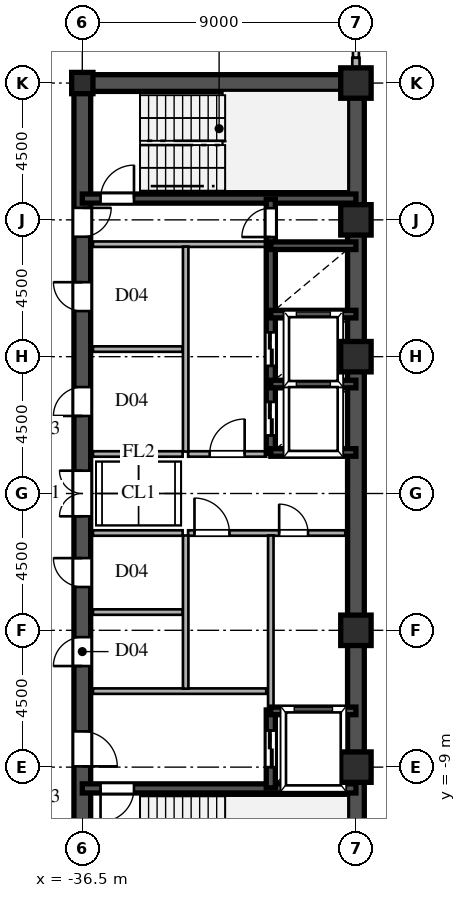
"""IFC4 building model, lengths in metres.
Left out: names, types, materials, properties, quantities, classifications, styles, units other than length and angle.
Written with IfcOpenShell. Run it as: python <this file> out.ifc"""

import sys

from ifc_helpers import new_model, si_unit, direction, frame, frame_2d, origin, origin_2d, place, context, subcontext, project, spatial, rectangle, hollow_rectangle, i_section, extrude, source, transform, mapped, element, fill, save


model = new_model("IFC4")
c1 = context("Model", 3, precision=1e-05, world=origin(), true_north=direction((0.0, 1.0)))
c2 = subcontext(c1, "Body", "Model", "MODEL_VIEW")
j1 = project(units=[si_unit("LENGTHUNIT", "METRE"), si_unit("PLANEANGLEUNIT", "RADIAN")], contexts=[c1])
p1 = place(None, origin())
s1 = spatial("IfcSite", under=j1, at=p1, CompositionType="ELEMENT")
p2 = place(p1, origin())
s2 = spatial("IfcBuilding", under=s1, at=p2, CompositionType="ELEMENT")
p3 = place(p2, frame((0.0, 0.0, 151.2)))
s3 = spatial("IfcBuildingStorey", under=s2, at=p3, CompositionType="ELEMENT", Elevation=151.2)
m1 = source(origin(), c2, "Body", "SweptSolid", [
    extrude(hollow_rectangle(XDim=1.0, YDim=1.0, WallThickness=0.042, at=origin_2d()), origin(), (0.0, 0.0, 1.0), 3.6),
])
for number, where, z_axis, x_axis in (
    (1, (-27.5, -9.0, 0.0), (0.0, 0.0, 1.0), (1.0, 0.0, 0.0)),
    (2, (-27.5, -4.5, 0.0), (0.0, 0.0, 1.0), (1.0, 0.0, 0.0)),
    (3, (-27.5, 4.5, 0.0), (0.0, 0.0, 1.0), (1.0, 0.0, 0.0)),
    (4, (-27.5, 9.0, 0.0), (0.0, 0.0, 1.0), (1.0, 0.0, 0.0)),
    (5, (-27.5, 13.5, 0.0), (0.0, 0.0, 1.0), (1.0, 0.0, 0.0)),
):
    element("IfcColumn", number, at=place(p3, frame(where, z_axis=z_axis, x_axis=x_axis)), inside=s3, PredefinedType="COLUMN", context=c2, shape_type="MappedRepresentation", body=[
        mapped(m1, transform((0.0, 0.0, 0.0), scale=1.0)),
    ])
m2 = source(origin(), c2, "Body", "SweptSolid", [
    extrude(i_section(OverallWidth=0.7, OverallDepth=0.7, WebThickness=0.028, FlangeThickness=0.045, at=origin_2d()), origin(), (0.0, 0.0, 1.0), 3.6),
])
p4 = place(p3, frame((-36.5, 13.5, 0.0), z_axis=(0.0, 0.0, 1.0), x_axis=(1.0, 0.0, 0.0)))
e6 = element("IfcColumn", 6, at=p4, inside=s3, PredefinedType="COLUMN", context=c2, shape_type="MappedRepresentation", body=[
    mapped(m2, transform((0.0, 0.0, 0.0), scale=1.0)),
])
p5 = place(p3, frame((-27.5, 13.78, 0.0), z_axis=(0.0, 0.0, 1.0), x_axis=(0.0, 1.0, 0.0)))
e7 = element("IfcWall", 7, at=p5, inside=s3, PredefinedType="SOLIDWALL", context=c2, shape_type="SweptSolid", body=[
    extrude(rectangle(XDim=0.55, YDim=0.24, at=frame_2d((0.275, 0.0))), origin(), (0.0, 0.0, 1.0), 2.88),
])
for number, where, z_axis, x_axis in (
    (8, (-27.5, -13.5, 0.0), (0.0, 0.0, 1.0), (0.0, 1.0, 0.0)),
    (9, (-27.5, 1.3, 0.0), (0.0, 0.0, 1.0), (0.0, 1.0, 0.0)),
):
    element("IfcWall", number, at=place(p3, frame(where, z_axis=z_axis, x_axis=x_axis)), inside=s3, PredefinedType="SHEAR", context=c2, shape_type="SweptSolid", body=[
        extrude(rectangle(XDim=12.2, YDim=0.55, at=frame_2d((6.1, 0.0))), origin(), (0.0, 0.0, 1.0), 3.38),
    ])
p6 = place(p3, frame((-27.5, -1.3, 0.0), z_axis=(0.0, 0.0, 1.0), x_axis=(0.0, 1.0, 0.0)))
e10 = element("IfcWall", 10, at=p6, inside=s3, PredefinedType="SHEAR", context=c2, shape_type="SweptSolid", body=[
    extrude(rectangle(XDim=2.6, YDim=0.55, at=frame_2d((1.3, 0.0))), origin(), (0.0, 0.0, 1.0), 3.38),
])
p7 = place(p3, frame((-36.5, 13.5, 0.0), z_axis=(0.0, 0.0, 1.0), x_axis=(1.0, 0.0, 0.0)))
e11 = element("IfcWall", 11, at=p7, inside=s3, PredefinedType="SHEAR", context=c2, shape_type="SweptSolid", body=[
    extrude(rectangle(XDim=9.0, YDim=0.55, at=frame_2d((4.5, 0.0))), origin(), (0.0, 0.0, 1.0), 3.38),
])
p8 = place(p3, frame((-36.5, -13.65, 0.0), z_axis=(0.0, 0.0, 1.0), x_axis=(0.0, 1.0, 0.0)))
e12 = element("IfcWall", 12, at=p8, inside=s3, PredefinedType="SHEAR", context=c2, shape_type="SweptSolid", body=[
    extrude(rectangle(XDim=7.15, YDim=0.55, at=frame_2d((3.575, 0.0))), origin(), (0.0, 0.0, 1.0), 3.38),
])
p9 = place(p8, frame((4.675, 0.0, 0.0)))
e13 = element("IfcOpeningElement", 13, at=p9, cuts=e12, PredefinedType="OPENING", context=c2, shape_type="SweptSolid", body=[
    extrude(rectangle(XDim=1.15, YDim=2.2, at=frame_2d((0.575, 1.1))), frame((0.0, 0.285, 0.0), z_axis=(0.0, -1.0, 0.0), x_axis=(1.0, 0.0, 0.0)), (0.0, 0.0, 1.0), 0.57),
])
p10 = place(p3, frame((-36.5, -1.3, 0.0), z_axis=(0.0, 0.0, 1.0), x_axis=(0.0, 1.0, 0.0)))
e14 = element("IfcWall", 14, at=p10, inside=s3, PredefinedType="SHEAR", context=c2, shape_type="SweptSolid", body=[
    extrude(rectangle(XDim=2.6, YDim=0.55, at=frame_2d((1.3, 0.0))), origin(), (0.0, 0.0, 1.0), 3.38),
])
p11 = place(p10, frame((0.55, 0.0, 0.0)))
e15 = element("IfcOpeningElement", 15, at=p11, cuts=e14, PredefinedType="OPENING", context=c2, shape_type="SweptSolid", body=[
    extrude(rectangle(XDim=1.5, YDim=2.3, at=frame_2d((0.75, 1.15))), frame((0.0, 0.285, 0.0), z_axis=(0.0, -1.0, 0.0), x_axis=(1.0, 0.0, 0.0)), (0.0, 0.0, 1.0), 0.57),
])
p12 = place(p3, frame((-36.5, 8.2, 0.0), z_axis=(0.0, 0.0, 1.0), x_axis=(0.0, 1.0, 0.0)))
e16 = element("IfcWall", 16, at=p12, inside=s3, PredefinedType="SHEAR", context=c2, shape_type="SweptSolid", body=[
    extrude(rectangle(XDim=5.45, YDim=0.55, at=frame_2d((2.725, 0.0))), origin(), (0.0, 0.0, 1.0), 3.38),
])
p13 = place(p12, frame((0.245, 0.0, 0.0)))
e17 = element("IfcOpeningElement", 17, at=p13, cuts=e16, PredefinedType="OPENING", context=c2, shape_type="SweptSolid", body=[
    extrude(rectangle(XDim=0.95, YDim=2.15, at=frame_2d((0.475, 1.075))), frame((0.0, 0.285, 0.0), z_axis=(0.0, -1.0, 0.0), x_axis=(1.0, 0.0, 0.0)), (0.0, 0.0, 1.0), 0.57),
])
p14 = place(p3, frame((-36.5, -6.5, 0.0), z_axis=(0.0, 0.0, 1.0), x_axis=(0.0, 1.0, 0.0)))
e18 = element("IfcWall", 18, at=p14, inside=s3, PredefinedType="SHEAR", context=c2, shape_type="SweptSolid", body=[
    extrude(rectangle(XDim=2.6, YDim=0.55, at=frame_2d((1.3, 0.0))), origin(), (0.0, 0.0, 1.0), 3.38),
])
p15 = place(p14, frame((0.825, 0.0, 0.0)))
e19 = element("IfcOpeningElement", 19, at=p15, cuts=e18, PredefinedType="OPENING", context=c2, shape_type="SweptSolid", body=[
    extrude(rectangle(XDim=0.95, YDim=2.15, at=frame_2d((0.475, 1.075))), frame((0.0, 0.285, 0.0), z_axis=(0.0, -1.0, 0.0), x_axis=(1.0, 0.0, 0.0)), (0.0, 0.0, 1.0), 0.57),
])
p16 = place(p3, frame((-36.5, -3.9, 0.0), z_axis=(0.0, 0.0, 1.0), x_axis=(0.0, 1.0, 0.0)))
e20 = element("IfcWall", 20, at=p16, inside=s3, PredefinedType="SHEAR", context=c2, shape_type="SweptSolid", body=[
    extrude(rectangle(XDim=2.6, YDim=0.55, at=frame_2d((1.3, 0.0))), origin(), (0.0, 0.0, 1.0), 3.38),
])
p17 = place(p16, frame((0.825, 0.0, 0.0)))
e21 = element("IfcOpeningElement", 21, at=p17, cuts=e20, PredefinedType="OPENING", context=c2, shape_type="SweptSolid", body=[
    extrude(rectangle(XDim=0.95, YDim=2.15, at=frame_2d((0.475, 1.075))), frame((0.0, 0.285, 0.0), z_axis=(0.0, -1.0, 0.0), x_axis=(1.0, 0.0, 0.0)), (0.0, 0.0, 1.0), 0.57),
])
p18 = place(p3, frame((-36.5, 1.3, 0.0), z_axis=(0.0, 0.0, 1.0), x_axis=(0.0, 1.0, 0.0)))
e22 = element("IfcWall", 22, at=p18, inside=s3, PredefinedType="SHEAR", context=c2, shape_type="SweptSolid", body=[
    extrude(rectangle(XDim=3.45, YDim=0.55, at=frame_2d((1.725, 0.0))), origin(), (0.0, 0.0, 1.0), 3.38),
])
p19 = place(p18, frame((1.25, 0.0, 0.0)))
e23 = element("IfcOpeningElement", 23, at=p19, cuts=e22, PredefinedType="OPENING", context=c2, shape_type="SweptSolid", body=[
    extrude(rectangle(XDim=0.95, YDim=2.15, at=frame_2d((0.475, 1.075))), frame((0.0, 0.285, 0.0), z_axis=(0.0, -1.0, 0.0), x_axis=(1.0, 0.0, 0.0)), (0.0, 0.0, 1.0), 0.57),
])
p20 = place(p3, frame((-36.5, 4.75, 0.0), z_axis=(0.0, 0.0, 1.0), x_axis=(0.0, 1.0, 0.0)))
e24 = element("IfcWall", 24, at=p20, inside=s3, PredefinedType="SHEAR", context=c2, shape_type="SweptSolid", body=[
    extrude(rectangle(XDim=3.45, YDim=0.55, at=frame_2d((1.725, 0.0))), origin(), (0.0, 0.0, 1.0), 3.38),
])
p21 = place(p20, frame((1.25, 0.0, 0.0)))
e25 = element("IfcOpeningElement", 25, at=p21, cuts=e24, PredefinedType="OPENING", context=c2, shape_type="SweptSolid", body=[
    extrude(rectangle(XDim=0.95, YDim=2.15, at=frame_2d((0.475, 1.075))), frame((0.0, 0.285, 0.0), z_axis=(0.0, -1.0, 0.0), x_axis=(1.0, 0.0, 0.0)), (0.0, 0.0, 1.0), 0.57),
])
p22 = place(p3, frame((-36.5, -9.7, 0.0), z_axis=(0.0, 0.0, 1.0), x_axis=(1.0, 0.0, 0.0)))
e26 = element("IfcWall", 26, at=p22, inside=s3, PredefinedType="SHEAR", context=c2, shape_type="SweptSolid", body=[
    extrude(rectangle(XDim=9.0, YDim=0.3, at=frame_2d((4.5, 0.0))), origin(), (0.0, 0.0, 1.0), 3.38),
])
p23 = place(p22, frame((0.6, 0.0, 0.0)))
e27 = element("IfcOpeningElement", 27, at=p23, cuts=e26, PredefinedType="OPENING", context=c2, shape_type="SweptSolid", body=[
    extrude(rectangle(XDim=1.1, YDim=2.2, at=frame_2d((0.55, 1.1))), frame((0.0, 0.16, 0.0), z_axis=(0.0, -1.0, 0.0), x_axis=(1.0, 0.0, 0.0)), (0.0, 0.0, 1.0), 0.32),
])
p24 = place(p3, frame((-36.5, 9.7, 0.0), z_axis=(0.0, 0.0, 1.0), x_axis=(1.0, 0.0, 0.0)))
e28 = element("IfcWall", 28, at=p24, inside=s3, PredefinedType="SHEAR", context=c2, shape_type="SweptSolid", body=[
    extrude(rectangle(XDim=9.0, YDim=0.3, at=frame_2d((4.5, 0.0))), origin(), (0.0, 0.0, 1.0), 3.38),
])
p25 = place(p24, frame((0.6, 0.0, 0.0)))
e29 = element("IfcOpeningElement", 29, at=p25, cuts=e28, PredefinedType="OPENING", context=c2, shape_type="SweptSolid", body=[
    extrude(rectangle(XDim=1.1, YDim=2.2, at=frame_2d((0.55, 1.1))), frame((0.0, 0.16, 0.0), z_axis=(0.0, -1.0, 0.0), x_axis=(1.0, 0.0, 0.0)), (0.0, 0.0, 1.0), 0.32),
])
for number, where, z_axis, x_axis in (
    (30, (-30.3, -7.15, 0.0), (0.0, 0.0, 1.0), (1.0, 0.0, 0.0)),
    (31, (-30.3, 1.35, 0.0), (0.0, 0.0, 1.0), (1.0, 0.0, 0.0)),
    (32, (-30.3, 3.6, 0.0), (0.0, 0.0, 1.0), (1.0, 0.0, 0.0)),
    (33, (-30.3, 5.9, 0.0), (0.0, 0.0, 1.0), (1.0, 0.0, 0.0)),
    (34, (-30.3, 8.15, 0.0), (0.0, 0.0, 1.0), (1.0, 0.0, 0.0)),
):
    element("IfcWall", number, at=place(p3, frame(where, z_axis=z_axis, x_axis=x_axis)), inside=s3, PredefinedType="SHEAR", context=c2, shape_type="SweptSolid", body=[
        extrude(rectangle(XDim=2.8, YDim=0.25, at=frame_2d((1.4, 0.0))), origin(), (0.0, 0.0, 1.0), 3.38),
    ])
p26 = place(p3, frame((-30.3, -9.68, 0.0), z_axis=(0.0, 0.0, 1.0), x_axis=(0.0, 1.0, 0.0)))
e35 = element("IfcWall", 35, at=p26, inside=s3, PredefinedType="SHEAR", context=c2, shape_type="SweptSolid", body=[
    extrude(rectangle(XDim=2.56, YDim=0.3, at=frame_2d((1.28, 0.0))), origin(), (0.0, 0.0, 1.0), 3.38),
])
p27 = place(p26, frame((0.68, 0.0, 0.0)))
e36 = element("IfcOpeningElement", 36, at=p27, cuts=e35, PredefinedType="OPENING", context=c2, shape_type="SweptSolid", body=[
    extrude(rectangle(XDim=1.2, YDim=2.25, at=frame_2d((0.6, 1.125))), frame((0.0, 0.16, 0.0), z_axis=(0.0, -1.0, 0.0), x_axis=(1.0, 0.0, 0.0)), (0.0, 0.0, 1.0), 0.32),
])
p28 = place(p3, frame((-30.3, 1.32, 0.0), z_axis=(0.0, 0.0, 1.0), x_axis=(0.0, 1.0, 0.0)))
e37 = element("IfcWall", 37, at=p28, inside=s3, PredefinedType="SHEAR", context=c2, shape_type="SweptSolid", body=[
    extrude(rectangle(XDim=2.28, YDim=0.3, at=frame_2d((1.14, 0.0))), origin(), (0.0, 0.0, 1.0), 3.38),
])
p29 = place(p28, frame((0.59, 0.0, 0.0)))
e38 = element("IfcOpeningElement", 38, at=p29, cuts=e37, PredefinedType="OPENING", context=c2, shape_type="SweptSolid", body=[
    extrude(rectangle(XDim=1.1, YDim=2.2, at=frame_2d((0.55, 1.1))), frame((0.0, 0.16, 0.0), z_axis=(0.0, -1.0, 0.0), x_axis=(1.0, 0.0, 0.0)), (0.0, 0.0, 1.0), 0.32),
])
p30 = place(p3, frame((-30.3, 3.6, 0.0), z_axis=(0.0, 0.0, 1.0), x_axis=(0.0, 1.0, 0.0)))
e39 = element("IfcWall", 39, at=p30, inside=s3, PredefinedType="SHEAR", context=c2, shape_type="SweptSolid", body=[
    extrude(rectangle(XDim=2.3, YDim=0.3, at=frame_2d((1.15, 0.0))), origin(), (0.0, 0.0, 1.0), 3.38),
])
p31 = place(p30, frame((0.6, 0.0, 0.0)))
e40 = element("IfcOpeningElement", 40, at=p31, cuts=e39, PredefinedType="OPENING", context=c2, shape_type="SweptSolid", body=[
    extrude(rectangle(XDim=1.1, YDim=2.2, at=frame_2d((0.55, 1.1))), frame((0.0, 0.16, 0.0), z_axis=(0.0, -1.0, 0.0), x_axis=(1.0, 0.0, 0.0)), (0.0, 0.0, 1.0), 0.32),
])
p32 = place(p3, frame((-30.3, 5.9, 0.0), z_axis=(0.0, 0.0, 1.0), x_axis=(0.0, 1.0, 0.0)))
e41 = element("IfcWall", 41, at=p32, inside=s3, PredefinedType="SHEAR", context=c2, shape_type="SweptSolid", body=[
    extrude(rectangle(XDim=2.25, YDim=0.3, at=frame_2d((1.125, 0.0))), origin(), (0.0, 0.0, 1.0), 3.38),
])
p33 = place(p3, frame((-30.3, 8.15, 0.0), z_axis=(0.0, 0.0, 1.0), x_axis=(0.0, 1.0, 0.0)))
e42 = element("IfcWall", 42, at=p33, inside=s3, PredefinedType="SHEAR", context=c2, shape_type="SweptSolid", body=[
    extrude(rectangle(XDim=1.53, YDim=0.3, at=frame_2d((0.765, 0.0))), origin(), (0.0, 0.0, 1.0), 3.38),
])
p34 = place(p33, frame((0.285, 0.0, 0.0)))
e43 = element("IfcOpeningElement", 43, at=p34, cuts=e42, PredefinedType="OPENING", context=c2, shape_type="SweptSolid", body=[
    extrude(rectangle(XDim=0.95, YDim=2.15, at=frame_2d((0.475, 1.075))), frame((0.0, 0.16, 0.0), z_axis=(0.0, -1.0, 0.0), x_axis=(1.0, 0.0, 0.0)), (0.0, 0.0, 1.0), 0.32),
])
for number, where, z_axis, x_axis in (
    (44, (-36.15, -6.5, 0.0), (0.0, 0.0, 1.0), (1.0, 0.0, 0.0)),
    (45, (-36.15, 8.2, 0.0), (0.0, 0.0, 1.0), (1.0, 0.0, 0.0)),
):
    element("IfcWall", number, at=place(p3, frame(where, z_axis=z_axis, x_axis=x_axis)), inside=s3, PredefinedType="PARTITIONING", context=c2, shape_type="SweptSolid", body=[
        extrude(rectangle(XDim=5.7, YDim=0.18, at=frame_2d((2.85, 0.0))), origin(), (0.0, 0.0, 1.0), 3.38),
    ])
p35 = place(p3, frame((-33.1, -6.42, 0.0), z_axis=(0.0, 0.0, 1.0), x_axis=(0.0, 1.0, 0.0)))
e46 = element("IfcWall", 46, at=p35, inside=s3, PredefinedType="PARTITIONING", context=c2, shape_type="SweptSolid", body=[
    extrude(rectangle(XDim=5.04, YDim=0.18, at=frame_2d((2.52, 0.0))), origin(), (0.0, 0.0, 1.0), 3.38),
])
p36 = place(p3, frame((-33.1, 1.38, 0.0), z_axis=(0.0, 0.0, 1.0), x_axis=(0.0, 1.0, 0.0)))
e47 = element("IfcWall", 47, at=p36, inside=s3, PredefinedType="PARTITIONING", context=c2, shape_type="SweptSolid", body=[
    extrude(rectangle(XDim=6.74, YDim=0.18, at=frame_2d((3.37, 0.0))), origin(), (0.0, 0.0, 1.0), 3.38),
])
p37 = place(p3, frame((-30.3, -1.3, 0.0), z_axis=(0.0, 0.0, 1.0), x_axis=(1.0, 0.0, 0.0)))
e48 = element("IfcWall", 48, at=p37, inside=s3, PredefinedType="PARTITIONING", context=c2, shape_type="SweptSolid", body=[
    extrude(rectangle(XDim=2.45, YDim=0.18, at=frame_2d((1.225, 0.0))), origin(), (0.0, 0.0, 1.0), 3.38),
])
p38 = place(p37, frame((0.275, 0.0, 0.0)))
e49 = element("IfcOpeningElement", 49, at=p38, cuts=e48, PredefinedType="OPENING", context=c2, shape_type="SweptSolid", body=[
    extrude(rectangle(XDim=0.95, YDim=2.15, at=frame_2d((0.475, 1.075))), frame((0.0, 0.1, 0.0), z_axis=(0.0, -1.0, 0.0), x_axis=(1.0, 0.0, 0.0)), (0.0, 0.0, 1.0), 0.2),
])
p39 = place(p3, frame((-33.02, -1.3, 0.0), z_axis=(0.0, 0.0, 1.0), x_axis=(1.0, 0.0, 0.0)))
e50 = element("IfcWall", 50, at=p39, inside=s3, PredefinedType="PARTITIONING", context=c2, shape_type="SweptSolid", body=[
    extrude(rectangle(XDim=2.72, YDim=0.18, at=frame_2d((1.36, 0.0))), origin(), (0.0, 0.0, 1.0), 3.38),
])
p40 = place(p39, frame((0.21, 0.0, 0.0)))
e51 = element("IfcOpeningElement", 51, at=p40, cuts=e50, PredefinedType="OPENING", context=c2, shape_type="SweptSolid", body=[
    extrude(rectangle(XDim=1.15, YDim=2.2, at=frame_2d((0.575, 1.1))), frame((0.0, 0.1, 0.0), z_axis=(0.0, -1.0, 0.0), x_axis=(1.0, 0.0, 0.0)), (0.0, 0.0, 1.0), 0.2),
])
p41 = place(p3, frame((-30.3, -7.12, 0.0), z_axis=(0.0, 0.0, 1.0), x_axis=(0.0, 1.0, 0.0)))
e52 = element("IfcWall", 52, at=p41, inside=s3, PredefinedType="PARTITIONING", context=c2, shape_type="SweptSolid", body=[
    extrude(rectangle(XDim=5.74, YDim=0.18, at=frame_2d((2.87, 0.0))), origin(), (0.0, 0.0, 1.0), 3.38),
])
p42 = place(p3, frame((-33.02, 1.3, 0.0), z_axis=(0.0, 0.0, 1.0), x_axis=(1.0, 0.0, 0.0)))
e53 = element("IfcWall", 53, at=p42, inside=s3, PredefinedType="PARTITIONING", context=c2, shape_type="SweptSolid", body=[
    extrude(rectangle(XDim=2.57, YDim=0.18, at=frame_2d((1.285, 0.0))), origin(), (0.0, 0.0, 1.0), 3.38),
])
p43 = place(p42, frame((0.71, 0.0, 0.0)))
e54 = element("IfcOpeningElement", 54, at=p43, cuts=e53, PredefinedType="OPENING", context=c2, shape_type="SweptSolid", body=[
    extrude(rectangle(XDim=1.15, YDim=2.2, at=frame_2d((0.575, 1.1))), frame((0.0, 0.1, 0.0), z_axis=(0.0, -1.0, 0.0), x_axis=(1.0, 0.0, 0.0)), (0.0, 0.0, 1.0), 0.2),
])
for number, where, z_axis, x_axis in (
    (55, (-36.15, -1.3, 0.0), (0.0, 0.0, 1.0), (1.0, 0.0, 0.0)),
    (56, (-36.15, 1.3, 0.0), (0.0, 0.0, 1.0), (1.0, 0.0, 0.0)),
    (57, (-36.15, -3.9, 0.0), (0.0, 0.0, 1.0), (1.0, 0.0, 0.0)),
    (58, (-36.15, 4.75, 0.0), (0.0, 0.0, 1.0), (1.0, 0.0, 0.0)),
):
    element("IfcWall", number, at=place(p3, frame(where, z_axis=z_axis, x_axis=x_axis)), inside=s3, PredefinedType="PARTITIONING", context=c2, shape_type="SweptSolid", body=[
        extrude(rectangle(XDim=2.95, YDim=0.18, at=frame_2d((1.475, 0.0))), origin(), (0.0, 0.0, 1.0), 3.38),
    ])
m3 = source(origin(), c2, "Body", "SweptSolid", [
    extrude(rectangle(XDim=1.15, YDim=2.2, at=frame_2d((0.575, 1.1))), frame((0.0, 0.025, 0.0), z_axis=(0.0, -1.0, 0.0), x_axis=(1.0, 0.0, 0.0)), (0.0, 0.0, 1.0), 0.05),
])
p44 = place(p9, frame((1.15, 0.0, 0.0), z_axis=(0.0, 0.0, 1.0), x_axis=(-1.0, 0.0, 0.0)))
e59 = element("IfcDoor", 59, at=p44, inside=s3, OperationType="SINGLE_SWING_LEFT", PredefinedType="DOOR", context=c2, shape_type="MappedRepresentation", body=[
    mapped(m3, transform((0.0, 0.0, 0.0), scale=1.0)),
])
fill(e13, e59)
m4 = source(origin(), c2, "Body", "SweptSolid", [
    extrude(rectangle(XDim=1.5, YDim=2.3, at=frame_2d((0.75, 1.15))), frame((0.0, 0.025, 0.0), z_axis=(0.0, -1.0, 0.0), x_axis=(1.0, 0.0, 0.0)), (0.0, 0.0, 1.0), 0.05),
])
p45 = place(p11, origin())
e60 = element("IfcDoor", 60, at=p45, inside=s3, OperationType="DOUBLE_SWING_LEFT", PredefinedType="DOOR", context=c2, shape_type="MappedRepresentation", body=[
    mapped(m4, transform((0.0, 0.0, 0.0), scale=1.0)),
])
fill(e15, e60)
m5 = source(origin(), c2, "Body", "SweptSolid", [
    extrude(rectangle(XDim=0.95, YDim=2.15, at=frame_2d((0.475, 1.075))), frame((0.0, 0.025, 0.0), z_axis=(0.0, -1.0, 0.0), x_axis=(1.0, 0.0, 0.0)), (0.0, 0.0, 1.0), 0.05),
])
p46 = place(p13, frame((0.95, 0.0, 0.0), z_axis=(0.0, 0.0, 1.0), x_axis=(-1.0, 0.0, 0.0)))
e61 = element("IfcDoor", 61, at=p46, inside=s3, OperationType="SINGLE_SWING_RIGHT", PredefinedType="DOOR", context=c2, shape_type="MappedRepresentation", body=[
    mapped(m5, transform((0.0, 0.0, 0.0), scale=1.0)),
])
fill(e17, e61)
p47 = place(p15, origin())
e62 = element("IfcDoor", 62, at=p47, inside=s3, OperationType="SINGLE_SWING_LEFT", PredefinedType="DOOR", context=c2, shape_type="MappedRepresentation", body=[
    mapped(m5, transform((0.0, 0.0, 0.0), scale=1.0)),
])
fill(e19, e62)
p48 = place(p17, origin())
e63 = element("IfcDoor", 63, at=p48, inside=s3, OperationType="SINGLE_SWING_RIGHT", PredefinedType="DOOR", context=c2, shape_type="MappedRepresentation", body=[
    mapped(m5, transform((0.0, 0.0, 0.0), scale=1.0)),
])
fill(e21, e63)
p49 = place(p19, origin())
e64 = element("IfcDoor", 64, at=p49, inside=s3, OperationType="SINGLE_SWING_LEFT", PredefinedType="DOOR", context=c2, shape_type="MappedRepresentation", body=[
    mapped(m5, transform((0.0, 0.0, 0.0), scale=1.0)),
])
fill(e23, e64)
p50 = place(p21, origin())
e65 = element("IfcDoor", 65, at=p50, inside=s3, OperationType="SINGLE_SWING_RIGHT", PredefinedType="DOOR", context=c2, shape_type="MappedRepresentation", body=[
    mapped(m5, transform((0.0, 0.0, 0.0), scale=1.0)),
])
fill(e25, e65)
m6 = source(origin(), c2, "Body", "SweptSolid", [
    extrude(rectangle(XDim=1.1, YDim=2.2, at=frame_2d((0.55, 1.1))), frame((0.0, 0.025, 0.0), z_axis=(0.0, -1.0, 0.0), x_axis=(1.0, 0.0, 0.0)), (0.0, 0.0, 1.0), 0.05),
])
p51 = place(p23, frame((1.1, 0.0, 0.0), z_axis=(0.0, 0.0, 1.0), x_axis=(-1.0, 0.0, 0.0)))
e66 = element("IfcDoor", 66, at=p51, inside=s3, OperationType="SINGLE_SWING_LEFT", PredefinedType="DOOR", context=c2, shape_type="MappedRepresentation", body=[
    mapped(m6, transform((0.0, 0.0, 0.0), scale=1.0)),
])
fill(e27, e66)
p52 = place(p25, origin())
e67 = element("IfcDoor", 67, at=p52, inside=s3, OperationType="SINGLE_SWING_RIGHT", PredefinedType="DOOR", context=c2, shape_type="MappedRepresentation", body=[
    mapped(m6, transform((0.0, 0.0, 0.0), scale=1.0)),
])
fill(e29, e67)
m7 = source(origin(), c2, "Body", "SweptSolid", [
    extrude(rectangle(XDim=1.2, YDim=2.25, at=frame_2d((0.6, 1.125))), frame((0.0, 0.025, 0.0), z_axis=(0.0, -1.0, 0.0), x_axis=(1.0, 0.0, 0.0)), (0.0, 0.0, 1.0), 0.05),
])
p53 = place(p27, origin())
e68 = element("IfcDoor", 68, at=p53, inside=s3, OperationType="DOUBLE_DOOR_SLIDING", PredefinedType="DOOR", context=c2, shape_type="MappedRepresentation", body=[
    mapped(m7, transform((0.0, 0.0, 0.0), scale=1.0)),
])
fill(e36, e68)
m8 = source(origin(), c2, "Body", "SweptSolid", [
    extrude(rectangle(XDim=1.1, YDim=2.2, at=frame_2d((0.55, 1.1))), frame((0.0, 0.025, 0.0), z_axis=(0.0, -1.0, 0.0), x_axis=(1.0, 0.0, 0.0)), (0.0, 0.0, 1.0), 0.05),
])
p54 = place(p29, origin())
e69 = element("IfcDoor", 69, at=p54, inside=s3, OperationType="DOUBLE_DOOR_SLIDING", PredefinedType="DOOR", context=c2, shape_type="MappedRepresentation", body=[
    mapped(m8, transform((0.0, 0.0, 0.0), scale=1.0)),
])
fill(e38, e69)
p55 = place(p31, origin())
e70 = element("IfcDoor", 70, at=p55, inside=s3, OperationType="DOUBLE_DOOR_SLIDING", PredefinedType="DOOR", context=c2, shape_type="MappedRepresentation", body=[
    mapped(m8, transform((0.0, 0.0, 0.0), scale=1.0)),
])
fill(e40, e70)
p56 = place(p34, origin())
e71 = element("IfcDoor", 71, at=p56, inside=s3, OperationType="SINGLE_SWING_LEFT", PredefinedType="DOOR", context=c2, shape_type="MappedRepresentation", body=[
    mapped(m5, transform((0.0, 0.0, 0.0), scale=1.0)),
])
fill(e43, e71)
p57 = place(p38, origin())
e72 = element("IfcDoor", 72, at=p57, inside=s3, OperationType="SINGLE_SWING_LEFT", PredefinedType="DOOR", context=c2, shape_type="MappedRepresentation", body=[
    mapped(m5, transform((0.0, 0.0, 0.0), scale=1.0)),
])
fill(e49, e72)
p58 = place(p40, origin())
e73 = element("IfcDoor", 73, at=p58, inside=s3, OperationType="SINGLE_SWING_LEFT", PredefinedType="DOOR", context=c2, shape_type="MappedRepresentation", body=[
    mapped(m3, transform((0.0, 0.0, 0.0), scale=1.0)),
])
fill(e51, e73)
p59 = place(p43, origin())
e74 = element("IfcDoor", 74, at=p59, inside=s3, OperationType="SINGLE_SWING_RIGHT", PredefinedType="DOOR", context=c2, shape_type="MappedRepresentation", body=[
    mapped(m3, transform((0.0, 0.0, 0.0), scale=1.0)),
])
fill(e54, e74)
save(model, sys.argv[1])
